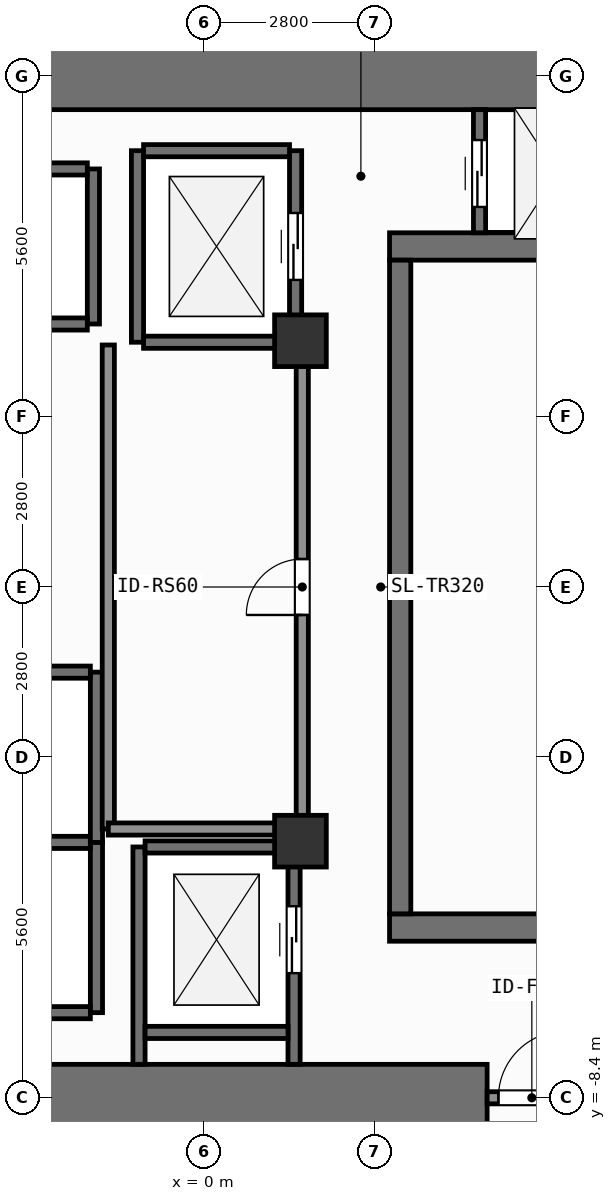
"""IFC4 building model, lengths in metres.
Left out: names, types, materials, properties, quantities, classifications, styles, units other than length and angle.
Written with IfcOpenShell. Run it as: python <this file> out.ifc"""

import sys

from ifc_helpers import new_model, si_unit, direction, frame, frame_2d, origin, origin_2d, place, context, subcontext, project, spatial, rectangle, extrude, element, fill, save


model = new_model("IFC4")
c1 = context("Model", 3, precision=1e-05, world=origin(), true_north=direction((0.0, 1.0)))
c2 = subcontext(c1, "Body", "Model", "MODEL_VIEW")
j1 = project(units=[si_unit("LENGTHUNIT", "METRE"), si_unit("PLANEANGLEUNIT", "RADIAN")], contexts=[c1])
p1 = place(None, origin())
s1 = spatial("IfcSite", under=j1, at=p1, CompositionType="ELEMENT")
p2 = place(p1, origin())
s2 = spatial("IfcBuilding", under=s1, at=p2, CompositionType="ELEMENT")
p3 = place(p2, frame((0.0, 0.0, 26.4)))
s3 = spatial("IfcBuildingStorey", under=s2, at=p3, CompositionType="ELEMENT", Elevation=26.4)
p4 = place(p3, frame((-2.62, -8.4, 0.0), z_axis=(0.0, 0.0, 1.0), x_axis=(1.0, 0.0, 0.0)))
e1 = element("IfcWall", 1, at=p4, inside=s3, PredefinedType="SHEAR", context=c2, shape_type="SweptSolid", body=[
    extrude(rectangle(XDim=7.27, YDim=1.1, at=frame_2d((3.635, 0.0))), origin(), (0.0, 0.0, 1.0), 4.2),
])
p5 = place(p3, frame((-7.55, 8.4, 0.0), z_axis=(0.0, 0.0, 1.0), x_axis=(1.0, 0.0, 0.0)))
e2 = element("IfcWall", 2, at=p5, inside=s3, PredefinedType="SHEAR", context=c2, shape_type="SweptSolid", body=[
    extrude(rectangle(XDim=16.5, YDim=1.1, at=frame_2d((8.25, 0.0))), origin(), (0.0, 0.0, 1.0), 4.2),
])
for number, where, z_axis, x_axis in (
    (3, (3.045, -5.6, 0.0), (0.0, 0.0, 1.0), (1.0, 0.0, 0.0)),
    (4, (3.045, 5.6, 0.0), (0.0, 0.0, 1.0), (1.0, 0.0, 0.0)),
):
    element("IfcWall", number, at=place(p3, frame(where, z_axis=z_axis, x_axis=x_axis)), inside=s3, PredefinedType="SHEAR", context=c2, shape_type="SweptSolid", body=[
        extrude(rectangle(XDim=5.905, YDim=0.45, at=frame_2d((2.953, 0.0))), origin(), (0.0, 0.0, 1.0), 4.2),
    ])
p6 = place(p3, frame((3.22, -5.375, 0.0), z_axis=(0.0, 0.0, 1.0), x_axis=(0.0, 1.0, 0.0)))
e5 = element("IfcWall", 5, at=p6, inside=s3, PredefinedType="SHEAR", context=c2, shape_type="SweptSolid", body=[
    extrude(rectangle(XDim=10.75, YDim=0.35, at=frame_2d((5.375, 0.0))), origin(), (0.0, 0.0, 1.0), 4.2),
])
for number, where, z_axis, x_axis in (
    (6, (1.58, -4.18, 0.0), (0.0, 0.0, 1.0), (1.0, 0.0, 0.0)),
    (7, (1.58, 4.05, 0.0), (0.0, 0.0, 1.0), (1.0, 0.0, 0.0)),
):
    element("IfcColumn", number, at=place(p3, frame(where, z_axis=z_axis, x_axis=x_axis)), inside=s3, PredefinedType="COLUMN", context=c2, shape_type="SweptSolid", body=[
        extrude(rectangle(XDim=0.85, YDim=0.85, at=origin_2d()), origin(), (0.0, 0.0, 1.0), 4.2),
    ])
p7 = place(p3, frame((-1.825, 4.325, 0.0), z_axis=(0.0, 0.0, 1.0), x_axis=(0.0, 1.0, 0.0)))
e8 = element("IfcWall", 8, at=p7, inside=s3, PredefinedType="SHEAR", context=c2, shape_type="SweptSolid", body=[
    extrude(rectangle(XDim=2.55, YDim=0.2, at=frame_2d((1.275, 0.0))), origin(), (0.0, 0.0, 1.0), 3.98),
])
for number, where, z_axis, x_axis in (
    (9, (-4.275, 4.325, 0.0), (0.0, 0.0, 1.0), (1.0, 0.0, 0.0)),
    (10, (-4.275, 6.875, 0.0), (0.0, 0.0, 1.0), (1.0, 0.0, 0.0)),
):
    element("IfcWall", number, at=place(p3, frame(where, z_axis=z_axis, x_axis=x_axis)), inside=s3, PredefinedType="SHEAR", context=c2, shape_type="SweptSolid", body=[
        extrude(rectangle(XDim=2.35, YDim=0.2, at=frame_2d((1.175, 0.0))), origin(), (0.0, 0.0, 1.0), 3.98),
    ])
p8 = place(p3, frame((-1.775, -7.0, 0.0), z_axis=(0.0, 0.0, 1.0), x_axis=(0.0, 1.0, 0.0)))
e11 = element("IfcWall", 11, at=p8, inside=s3, PredefinedType="SHEAR", context=c2, shape_type="SweptSolid", body=[
    extrude(rectangle(XDim=2.8, YDim=0.2, at=frame_2d((1.4, 0.0))), origin(), (0.0, 0.0, 1.0), 3.98),
])
for number, where, z_axis, x_axis in (
    (12, (-4.325, -7.0, 0.0), (0.0, 0.0, 1.0), (1.0, 0.0, 0.0)),
    (13, (-4.325, -4.2, 0.0), (0.0, 0.0, 1.0), (1.0, 0.0, 0.0)),
):
    element("IfcWall", number, at=place(p3, frame(where, z_axis=z_axis, x_axis=x_axis)), inside=s3, PredefinedType="SHEAR", context=c2, shape_type="SweptSolid", body=[
        extrude(rectangle(XDim=2.45, YDim=0.2, at=frame_2d((1.225, 0.0))), origin(), (0.0, 0.0, 1.0), 3.98),
    ])
p9 = place(p3, frame((-1.775, -4.2, 0.0), z_axis=(0.0, 0.0, 1.0), x_axis=(0.0, 1.0, 0.0)))
e14 = element("IfcWall", 14, at=p9, inside=s3, PredefinedType="SHEAR", context=c2, shape_type="SweptSolid", body=[
    extrude(rectangle(XDim=2.8, YDim=0.2, at=frame_2d((1.4, 0.0))), origin(), (0.0, 0.0, 1.0), 3.98),
])
p10 = place(p3, frame((-4.325, -1.4, 0.0), z_axis=(0.0, 0.0, 1.0), x_axis=(1.0, 0.0, 0.0)))
e15 = element("IfcWall", 15, at=p10, inside=s3, PredefinedType="SHEAR", context=c2, shape_type="SweptSolid", body=[
    extrude(rectangle(XDim=2.45, YDim=0.2, at=frame_2d((1.225, 0.0))), origin(), (0.0, 0.0, 1.0), 3.98),
])
p11 = place(p3, frame((-1.1, 4.025, 0.0), z_axis=(0.0, 0.0, 1.0), x_axis=(0.0, 1.0, 0.0)))
e16 = element("IfcWall", 16, at=p11, inside=s3, PredefinedType="SHEAR", context=c2, shape_type="SweptSolid", body=[
    extrude(rectangle(XDim=3.15, YDim=0.2, at=frame_2d((1.575, 0.0))), origin(), (0.0, 0.0, 1.0), 3.98),
])
p12 = place(p3, frame((1.5, 4.025, 0.0), z_axis=(0.0, 0.0, 1.0), x_axis=(0.0, 1.0, 0.0)))
e17 = element("IfcWall", 17, at=p12, inside=s3, PredefinedType="SHEAR", context=c2, shape_type="SweptSolid", body=[
    extrude(rectangle(XDim=3.15, YDim=0.2, at=frame_2d((1.575, 0.0))), origin(), (0.0, 0.0, 1.0), 3.98),
])
p13 = place(p12, frame((1.025, 0.0, 0.0)))
e18 = element("IfcOpeningElement", 18, at=p13, cuts=e17, PredefinedType="OPENING", context=c2, shape_type="SweptSolid", body=[
    extrude(rectangle(XDim=1.1, YDim=2.2, at=frame_2d((0.55, 1.1))), frame((0.0, 0.11, 0.0), z_axis=(0.0, -1.0, 0.0), x_axis=(1.0, 0.0, 0.0)), (0.0, 0.0, 1.0), 0.22),
])
for number, where, z_axis, x_axis in (
    (19, (-1.0, 4.025, 0.0), (0.0, 0.0, 1.0), (1.0, 0.0, 0.0)),
    (20, (-1.0, 7.175, 0.0), (0.0, 0.0, 1.0), (1.0, 0.0, 0.0)),
):
    element("IfcWall", number, at=place(p3, frame(where, z_axis=z_axis, x_axis=x_axis)), inside=s3, PredefinedType="SHEAR", context=c2, shape_type="SweptSolid", body=[
        extrude(rectangle(XDim=2.4, YDim=0.2, at=frame_2d((1.2, 0.0))), origin(), (0.0, 0.0, 1.0), 3.98),
    ])
p14 = place(p3, frame((-1.075, -7.85, 0.0), z_axis=(0.0, 0.0, 1.0), x_axis=(0.0, 1.0, 0.0)))
e21 = element("IfcWall", 21, at=p14, inside=s3, PredefinedType="SHEAR", context=c2, shape_type="SweptSolid", body=[
    extrude(rectangle(XDim=3.575, YDim=0.2, at=frame_2d((1.788, 0.0))), origin(), (0.0, 0.0, 1.0), 3.98),
])
p15 = place(p3, frame((1.475, -7.85, 0.0), z_axis=(0.0, 0.0, 1.0), x_axis=(0.0, 1.0, 0.0)))
e22 = element("IfcWall", 22, at=p15, inside=s3, PredefinedType="SHEAR", context=c2, shape_type="SweptSolid", body=[
    extrude(rectangle(XDim=3.575, YDim=0.2, at=frame_2d((1.788, 0.0))), origin(), (0.0, 0.0, 1.0), 3.98),
])
p16 = place(p15, frame((1.5, 0.0, 0.0)))
e23 = element("IfcOpeningElement", 23, at=p16, cuts=e22, PredefinedType="OPENING", context=c2, shape_type="SweptSolid", body=[
    extrude(rectangle(XDim=1.1, YDim=2.2, at=frame_2d((0.55, 1.1))), frame((0.0, 0.11, 0.0), z_axis=(0.0, -1.0, 0.0), x_axis=(1.0, 0.0, 0.0)), (0.0, 0.0, 1.0), 0.22),
])
for number, where, z_axis, x_axis in (
    (24, (-0.975, -7.325, 0.0), (0.0, 0.0, 1.0), (1.0, 0.0, 0.0)),
    (25, (-0.975, -4.275, 0.0), (0.0, 0.0, 1.0), (1.0, 0.0, 0.0)),
):
    element("IfcWall", number, at=place(p3, frame(where, z_axis=z_axis, x_axis=x_axis)), inside=s3, PredefinedType="SHEAR", context=c2, shape_type="SweptSolid", body=[
        extrude(rectangle(XDim=2.35, YDim=0.2, at=frame_2d((1.175, 0.0))), origin(), (0.0, 0.0, 1.0), 3.98),
    ])
p17 = place(p3, frame((4.525, 5.825, 0.0), z_axis=(0.0, 0.0, 1.0), x_axis=(0.0, 1.0, 0.0)))
e26 = element("IfcWall", 26, at=p17, inside=s3, PredefinedType="SHEAR", context=c2, shape_type="SweptSolid", body=[
    extrude(rectangle(XDim=2.025, YDim=0.2, at=frame_2d((1.013, 0.0))), origin(), (0.0, 0.0, 1.0), 3.98),
])
p18 = place(p17, frame((0.425, 0.0, 0.0)))
e27 = element("IfcOpeningElement", 27, at=p18, cuts=e26, PredefinedType="OPENING", context=c2, shape_type="SweptSolid", body=[
    extrude(rectangle(XDim=1.1, YDim=2.2, at=frame_2d((0.55, 1.1))), frame((0.0, 0.11, 0.0), z_axis=(0.0, -1.0, 0.0), x_axis=(1.0, 0.0, 0.0)), (0.0, 0.0, 1.0), 0.22),
])
p19 = place(p3, frame((4.65, -8.4, 0.0), z_axis=(0.0, 0.0, 1.0), x_axis=(1.0, 0.0, 0.0)))
e28 = element("IfcWall", 28, at=p19, inside=s3, PredefinedType="SOLIDWALL", context=c2, shape_type="SweptSolid", body=[
    extrude(rectangle(XDim=1.47, YDim=0.2, at=frame_2d((0.735, 0.0))), origin(), (0.0, 0.0, 1.0), 3.02),
])
p20 = place(p19, frame((0.185, 0.0, 0.0)))
e29 = element("IfcOpeningElement", 29, at=p20, cuts=e28, PredefinedType="OPENING", context=c2, shape_type="SweptSolid", body=[
    extrude(rectangle(XDim=1.1, YDim=2.15, at=frame_2d((0.55, 1.075))), frame((0.0, 0.11, 0.0), z_axis=(0.0, -1.0, 0.0), x_axis=(1.0, 0.0, 0.0)), (0.0, 0.0, 1.0), 0.22),
])
p21 = place(p3, frame((1.61, -3.98, 0.0), z_axis=(0.0, 0.0, 1.0), x_axis=(0.0, 1.0, 0.0)))
e30 = element("IfcWall", 30, at=p21, inside=s3, PredefinedType="SOLIDWALL", context=c2, shape_type="SweptSolid", body=[
    extrude(rectangle(XDim=7.96, YDim=0.2, at=frame_2d((3.98, 0.0))), origin(), (0.0, 0.0, 1.0), 3.98),
])
p22 = place(p21, frame((3.52, 0.0, 0.0)))
e31 = element("IfcOpeningElement", 31, at=p22, cuts=e30, PredefinedType="OPENING", context=c2, shape_type="SweptSolid", body=[
    extrude(rectangle(XDim=0.92, YDim=2.1, at=frame_2d((0.46, 1.05))), frame((0.0, 0.11, 0.0), z_axis=(0.0, -1.0, 0.0), x_axis=(1.0, 0.0, 0.0)), (0.0, 0.0, 1.0), 0.22),
])
p23 = place(p3, frame((-1.58, -3.98, 0.0), z_axis=(0.0, 0.0, 1.0), x_axis=(0.0, 1.0, 0.0)))
e32 = element("IfcWall", 32, at=p23, inside=s3, PredefinedType="SOLIDWALL", context=c2, shape_type="SweptSolid", body=[
    extrude(rectangle(XDim=7.96, YDim=0.2, at=frame_2d((3.98, 0.0))), origin(), (0.0, 0.0, 1.0), 3.98),
])
p24 = place(p3, frame((-1.58, -3.98, 0.0), z_axis=(0.0, 0.0, 1.0), x_axis=(1.0, 0.0, 0.0)))
e33 = element("IfcWall", 33, at=p24, inside=s3, PredefinedType="SOLIDWALL", context=c2, shape_type="SweptSolid", body=[
    extrude(rectangle(XDim=3.19, YDim=0.2, at=frame_2d((1.595, 0.0))), origin(), (0.0, 0.0, 1.0), 3.98),
])
p25 = place(p13, origin())
e34 = element("IfcDoor", 34, at=p25, inside=s3, OperationType="SLIDING_TO_LEFT", PredefinedType="DOOR", context=c2, shape_type="SweptSolid", body=[
    extrude(rectangle(XDim=1.1, YDim=2.2, at=frame_2d((0.55, 1.1))), frame((0.0, 0.025, 0.0), z_axis=(0.0, -1.0, 0.0), x_axis=(1.0, 0.0, 0.0)), (0.0, 0.0, 1.0), 0.05),
])
fill(e18, e34)
p26 = place(p16, origin())
e35 = element("IfcDoor", 35, at=p26, inside=s3, OperationType="SLIDING_TO_LEFT", PredefinedType="DOOR", context=c2, shape_type="SweptSolid", body=[
    extrude(rectangle(XDim=1.1, YDim=2.2, at=frame_2d((0.55, 1.1))), frame((0.0, 0.025, 0.0), z_axis=(0.0, -1.0, 0.0), x_axis=(1.0, 0.0, 0.0)), (0.0, 0.0, 1.0), 0.05),
])
fill(e23, e35)
p27 = place(p18, origin())
e36 = element("IfcDoor", 36, at=p27, inside=s3, OperationType="SLIDING_TO_LEFT", PredefinedType="DOOR", context=c2, shape_type="SweptSolid", body=[
    extrude(rectangle(XDim=1.1, YDim=2.2, at=frame_2d((0.55, 1.1))), frame((0.0, 0.025, 0.0), z_axis=(0.0, -1.0, 0.0), x_axis=(1.0, 0.0, 0.0)), (0.0, 0.0, 1.0), 0.05),
])
fill(e27, e36)
p28 = place(p20, origin())
e37 = element("IfcDoor", 37, at=p28, inside=s3, OperationType="SINGLE_SWING_RIGHT", PredefinedType="DOOR", context=c2, shape_type="SweptSolid", body=[
    extrude(rectangle(XDim=1.1, YDim=2.15, at=frame_2d((0.55, 1.075))), frame((0.0, 0.025, 0.0), z_axis=(0.0, -1.0, 0.0), x_axis=(1.0, 0.0, 0.0)), (0.0, 0.0, 1.0), 0.05),
])
fill(e29, e37)
p29 = place(p22, origin())
e38 = element("IfcDoor", 38, at=p29, inside=s3, OperationType="SINGLE_SWING_LEFT", PredefinedType="DOOR", context=c2, shape_type="SweptSolid", body=[
    extrude(rectangle(XDim=0.92, YDim=2.1, at=frame_2d((0.46, 1.05))), frame((0.0, 0.025, 0.0), z_axis=(0.0, -1.0, 0.0), x_axis=(1.0, 0.0, 0.0)), (0.0, 0.0, 1.0), 0.05),
])
fill(e31, e38)
save(model, sys.argv[1])
